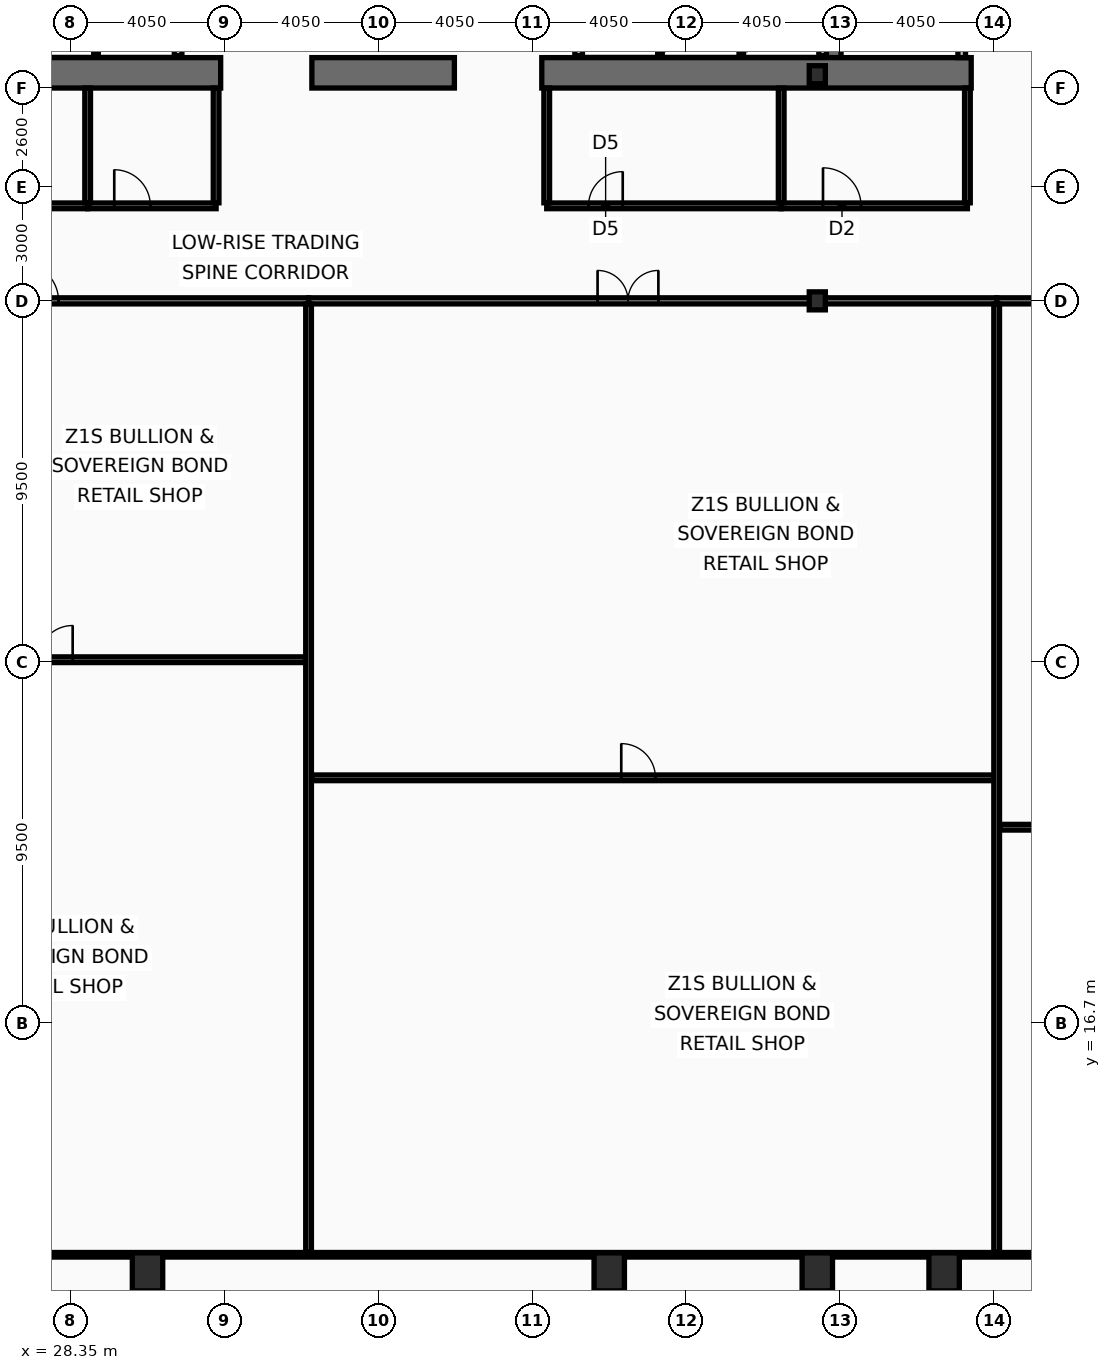
"""IFC4 building model, lengths in metres.
Left out: names, types, materials, properties, quantities, classifications, styles, units other than length and angle.
Written with IfcOpenShell. Run it as: python <this file> out.ifc"""

import sys

from ifc_helpers import new_model, si_unit, direction, frame, frame_2d, origin, origin_2d, place, context, subcontext, project, spatial, rectangle, hollow_rectangle, i_section, extrude, element, fill, save


model = new_model("IFC4")
c1 = context("Model", 3, precision=1e-05, world=origin(), true_north=direction((0.0, 1.0)))
c2 = subcontext(c1, "Body", "Model", "MODEL_VIEW")
j1 = project(units=[si_unit("LENGTHUNIT", "METRE"), si_unit("PLANEANGLEUNIT", "RADIAN")], contexts=[c1])
p1 = place(None, origin())
s1 = spatial("IfcSite", under=j1, at=p1, CompositionType="ELEMENT")
p2 = place(p1, origin())
s2 = spatial("IfcBuilding", under=s1, at=p2, CompositionType="ELEMENT")
p3 = place(p2, frame((0.0, 0.0, 53.8)))
s3 = spatial("IfcBuildingStorey", under=s2, at=p3, CompositionType="ELEMENT", Elevation=53.8)
p4 = place(p3, frame((48.4, 42.1, 0.0), z_axis=(0.0, 0.0, 1.0), x_axis=(0.0, 1.0, 0.0)))
e1 = element("IfcWall", 1, at=p4, inside=s3, PredefinedType="SHEAR", context=c2, shape_type="SweptSolid", body=[
    extrude(rectangle(XDim=10.8, YDim=0.45, at=frame_2d((5.4, 0.0))), origin(), (0.0, 0.0, 1.0), 3.82),
])
p5 = place(p3, frame((32.3, 41.7, 0.0), z_axis=(0.0, 0.0, 1.0), x_axis=(-1.0, 0.0, 0.0)))
e2 = element("IfcWall", 2, at=p5, inside=s3, PredefinedType="SHEAR", context=c2, shape_type="SweptSolid", body=[
    extrude(rectangle(XDim=11.45, YDim=0.8, at=frame_2d((5.725, 0.0))), origin(), (0.0, 0.0, 1.0), 3.82),
])
p6 = place(p3, frame((38.45, 41.7, 0.0), z_axis=(0.0, 0.0, 1.0), x_axis=(-1.0, 0.0, 0.0)))
e3 = element("IfcWall", 3, at=p6, inside=s3, PredefinedType="SHEAR", context=c2, shape_type="SweptSolid", body=[
    extrude(rectangle(XDim=3.75, YDim=0.8, at=frame_2d((1.875, 0.0))), origin(), (0.0, 0.0, 1.0), 3.82),
])
p7 = place(p3, frame((52.05, 41.7, 0.0), z_axis=(0.0, 0.0, 1.0), x_axis=(-1.0, 0.0, 0.0)))
e4 = element("IfcWall", 4, at=p7, inside=s3, PredefinedType="SHEAR", context=c2, shape_type="SweptSolid", body=[
    extrude(rectangle(XDim=11.3, YDim=0.8, at=frame_2d((5.65, 0.0))), origin(), (0.0, 0.0, 1.0), 3.82),
])
for number, where, z_axis, x_axis in (
    (5, (30.375, 10.15, 0.0), (0.0, 0.0, 1.0), (1.0, 0.0, 0.0)),
    (6, (42.525, 10.15, 0.0), (0.0, 0.0, 1.0), (1.0, 0.0, 0.0)),
    (7, (48.0, 10.15, 0.0), (0.0, 0.0, 1.0), (1.0, 0.0, 0.0)),
    (8, (51.337, 10.15, 0.0), (0.0, 0.0, 1.0), (1.0, 0.0, 0.0)),
):
    element("IfcColumn", number, at=place(p3, frame(where, z_axis=z_axis, x_axis=x_axis)), inside=s3, PredefinedType="COLUMN", context=c2, shape_type="SweptSolid", body=[
        extrude(hollow_rectangle(XDim=0.8, YDim=1.0, WallThickness=0.055, at=origin_2d()), origin(), (0.0, 0.0, 1.0), 4.0),
    ])
for number, where, z_axis, x_axis in (
    (9, (48.0, 35.7, 0.0), (0.0, 0.0, 1.0), (1.0, 0.0, 0.0)),
    (10, (48.0, 41.65, 0.0), (0.0, 0.0, 1.0), (1.0, 0.0, 0.0)),
):
    element("IfcColumn", number, at=place(p3, frame(where, z_axis=z_axis, x_axis=x_axis)), inside=s3, PredefinedType="COLUMN", context=c2, shape_type="SweptSolid", body=[
        extrude(i_section(OverallWidth=0.424, OverallDepth=0.474, WebThickness=0.048, FlangeThickness=0.077, at=origin_2d()), origin(), (0.0, 0.0, 1.0), 4.0),
    ])
p8 = place(p3, frame((51.8, 42.1, 0.0), z_axis=(0.0, 0.0, 1.0), x_axis=(0.0, 1.0, 0.0)))
e11 = element("IfcWall", 11, at=p8, inside=s3, PredefinedType="PARTITIONING", context=c2, shape_type="SweptSolid", body=[
    extrude(rectangle(XDim=2.395, YDim=0.2, at=frame_2d((1.198, 0.0))), origin(), (0.0, 0.0, 1.0), 3.82),
])
p9 = place(p8, frame((0.38, 0.0, 0.0)))
e12 = element("IfcOpeningElement", 12, at=p9, cuts=e11, PredefinedType="OPENING", context=c2, shape_type="SweptSolid", body=[
    extrude(rectangle(XDim=1.05, YDim=2.15, at=frame_2d((0.525, 1.075))), frame((0.0, 0.11, 0.0), z_axis=(0.0, -1.0, 0.0), x_axis=(1.0, 0.0, 0.0)), (0.0, 0.0, 1.0), 0.22),
])
p10 = place(p3, frame((31.18, 42.15, 0.0), z_axis=(0.0, 0.0, 1.0), x_axis=(0.0, 1.0, 0.0)))
e13 = element("IfcWall", 13, at=p10, inside=s3, PredefinedType="PARTITIONING", context=c2, shape_type="SweptSolid", body=[
    extrude(rectangle(XDim=2.095, YDim=0.2, at=frame_2d((1.048, 0.0))), origin(), (0.0, 0.0, 1.0), 3.82),
])
p11 = place(p3, frame((29.02, 42.15, 0.0), z_axis=(0.0, 0.0, 1.0), x_axis=(0.0, 1.0, 0.0)))
e14 = element("IfcWall", 14, at=p11, inside=s3, PredefinedType="PARTITIONING", context=c2, shape_type="SweptSolid", body=[
    extrude(rectangle(XDim=2.095, YDim=0.12, at=frame_2d((1.048, 0.0))), origin(), (0.0, 0.0, 1.0), 3.82),
])
for number, where, z_axis, x_axis in (
    (15, (41.72, 42.15, 0.0), (0.0, 0.0, 1.0), (0.0, 1.0, 0.0)),
    (16, (48.14, 42.15, 0.0), (0.0, 0.0, 1.0), (0.0, 1.0, 0.0)),
):
    element("IfcWall", number, at=place(p3, frame(where, z_axis=z_axis, x_axis=x_axis)), inside=s3, PredefinedType="PARTITIONING", context=c2, shape_type="SweptSolid", body=[
        extrude(rectangle(XDim=2.095, YDim=0.2, at=frame_2d((1.048, 0.0))), origin(), (0.0, 0.0, 1.0), 3.82),
    ])
for number, where, z_axis, x_axis in (
    (17, (43.86, 42.15, 0.0), (0.0, 0.0, 1.0), (0.0, 1.0, 0.0)),
    (18, (46.0, 42.15, 0.0), (0.0, 0.0, 1.0), (0.0, 1.0, 0.0)),
):
    element("IfcWall", number, at=place(p3, frame(where, z_axis=z_axis, x_axis=x_axis)), inside=s3, PredefinedType="PARTITIONING", context=c2, shape_type="SweptSolid", body=[
        extrude(rectangle(XDim=2.095, YDim=0.12, at=frame_2d((1.048, 0.0))), origin(), (0.0, 0.0, 1.0), 3.82),
    ])
p12 = place(p3, frame((25.5, 38.2, 0.0), z_axis=(0.0, 0.0, 1.0), x_axis=(1.0, 0.0, 0.0)))
e19 = element("IfcWall", 19, at=p12, inside=s3, PredefinedType="PARTITIONING", context=c2, shape_type="SweptSolid", body=[
    extrude(rectangle(XDim=3.3, YDim=0.15, at=frame_2d((1.65, 0.0))), origin(), (0.0, 0.0, 1.0), 3.82),
])
p13 = place(p12, frame((0.9, 0.0, 0.0)))
e20 = element("IfcOpeningElement", 20, at=p13, cuts=e19, PredefinedType="OPENING", context=c2, shape_type="SweptSolid", body=[
    extrude(rectangle(XDim=0.95, YDim=2.05, at=frame_2d((0.475, 1.025))), frame((0.0, 0.085, 0.0), z_axis=(0.0, -1.0, 0.0), x_axis=(1.0, 0.0, 0.0)), (0.0, 0.0, 1.0), 0.17),
])
p14 = place(p3, frame((28.8, 38.2, 0.0), z_axis=(0.0, 0.0, 1.0), x_axis=(1.0, 0.0, 0.0)))
e21 = element("IfcWall", 21, at=p14, inside=s3, PredefinedType="PARTITIONING", context=c2, shape_type="SweptSolid", body=[
    extrude(rectangle(XDim=3.38, YDim=0.15, at=frame_2d((1.69, 0.0))), origin(), (0.0, 0.0, 1.0), 3.01),
])
p15 = place(p14, frame((0.7, 0.0, 0.0)))
e22 = element("IfcOpeningElement", 22, at=p15, cuts=e21, PredefinedType="OPENING", context=c2, shape_type="SweptSolid", body=[
    extrude(rectangle(XDim=0.95, YDim=2.05, at=frame_2d((0.475, 1.025))), frame((0.0, 0.085, 0.0), z_axis=(0.0, -1.0, 0.0), x_axis=(1.0, 0.0, 0.0)), (0.0, 0.0, 1.0), 0.17),
])
for number, where, z_axis, x_axis in (
    (23, (28.8, 38.28, 0.0), (0.0, 0.0, 1.0), (0.0, 1.0, 0.0)),
    (24, (32.18, 38.28, 0.0), (0.0, 0.0, 1.0), (0.0, 1.0, 0.0)),
):
    element("IfcWall", number, at=place(p3, frame(where, z_axis=z_axis, x_axis=x_axis)), inside=s3, PredefinedType="PARTITIONING", context=c2, shape_type="SweptSolid", body=[
        extrude(rectangle(XDim=3.02, YDim=0.15, at=frame_2d((1.51, 0.0))), origin(), (0.0, 0.0, 1.0), 3.82),
    ])
p16 = place(p3, frame((40.88, 38.2, 0.0), z_axis=(0.0, 0.0, 1.0), x_axis=(1.0, 0.0, 0.0)))
e25 = element("IfcWall", 25, at=p16, inside=s3, PredefinedType="PARTITIONING", context=c2, shape_type="SweptSolid", body=[
    extrude(rectangle(XDim=6.17, YDim=0.15, at=frame_2d((3.085, 0.0))), origin(), (0.0, 0.0, 1.0), 3.01),
])
p17 = place(p16, frame((1.1, 0.0, 0.0)))
e26 = element("IfcOpeningElement", 26, at=p17, cuts=e25, PredefinedType="OPENING", context=c2, shape_type="SweptSolid", body=[
    extrude(rectangle(XDim=0.9, YDim=2.05, at=frame_2d((0.45, 1.025))), frame((0.0, 0.085, 0.0), z_axis=(0.0, -1.0, 0.0), x_axis=(1.0, 0.0, 0.0)), (0.0, 0.0, 1.0), 0.17),
])
p18 = place(p3, frame((47.05, 38.2, 0.0), z_axis=(0.0, 0.0, 1.0), x_axis=(1.0, 0.0, 0.0)))
e27 = element("IfcWall", 27, at=p18, inside=s3, PredefinedType="PARTITIONING", context=c2, shape_type="SweptSolid", body=[
    extrude(rectangle(XDim=4.9, YDim=0.15, at=frame_2d((2.45, 0.0))), origin(), (0.0, 0.0, 1.0), 3.01),
])
p19 = place(p18, frame((1.1, 0.0, 0.0)))
e28 = element("IfcOpeningElement", 28, at=p19, cuts=e27, PredefinedType="OPENING", context=c2, shape_type="SweptSolid", body=[
    extrude(rectangle(XDim=1.0, YDim=2.05, at=frame_2d((0.5, 1.025))), frame((0.0, 0.085, 0.0), z_axis=(0.0, -1.0, 0.0), x_axis=(1.0, 0.0, 0.0)), (0.0, 0.0, 1.0), 0.17),
])
for number, where, z_axis, x_axis in (
    (29, (40.88, 38.28, 0.0), (0.0, 0.0, 1.0), (0.0, 1.0, 0.0)),
    (30, (47.05, 38.28, 0.0), (0.0, 0.0, 1.0), (0.0, 1.0, 0.0)),
    (31, (51.95, 38.28, 0.0), (0.0, 0.0, 1.0), (0.0, 1.0, 0.0)),
):
    element("IfcWall", number, at=place(p3, frame(where, z_axis=z_axis, x_axis=x_axis)), inside=s3, PredefinedType="PARTITIONING", context=c2, shape_type="SweptSolid", body=[
        extrude(rectangle(XDim=3.02, YDim=0.15, at=frame_2d((1.51, 0.0))), origin(), (0.0, 0.0, 1.0), 3.82),
    ])
p20 = place(p3, frame((21.545, 35.7, 0.0), z_axis=(0.0, 0.0, 1.0), x_axis=(1.0, 0.0, 0.0)))
e32 = element("IfcWall", 32, at=p20, inside=s3, PredefinedType="PARTITIONING", context=c2, shape_type="SweptSolid", body=[
    extrude(rectangle(XDim=13.068, YDim=0.16, at=frame_2d((6.534, 0.0))), origin(), (0.0, 0.0, 1.0), 3.01),
])
p21 = place(p20, frame((5.489, 0.0, 0.0)))
e33 = element("IfcOpeningElement", 33, at=p21, cuts=e32, PredefinedType="OPENING", context=c2, shape_type="SweptSolid", body=[
    extrude(rectangle(XDim=1.0, YDim=2.05, at=frame_2d((0.5, 1.025))), frame((0.0, 0.09, 0.0), z_axis=(0.0, -1.0, 0.0), x_axis=(1.0, 0.0, 0.0)), (0.0, 0.0, 1.0), 0.18),
])
p22 = place(p3, frame((21.625, 26.257, 0.0), z_axis=(0.0, 0.0, 1.0), x_axis=(1.0, 0.0, 0.0)))
e34 = element("IfcWall", 34, at=p22, inside=s3, PredefinedType="PARTITIONING", context=c2, shape_type="SweptSolid", body=[
    extrude(rectangle(XDim=12.908, YDim=0.15, at=frame_2d((6.454, 0.0))), origin(), (0.0, 0.0, 1.0), 3.01),
])
p23 = place(p22, frame((5.881, 0.0, 0.0)))
e35 = element("IfcOpeningElement", 35, at=p23, cuts=e34, PredefinedType="OPENING", context=c2, shape_type="SweptSolid", body=[
    extrude(rectangle(XDim=0.9, YDim=2.05, at=frame_2d((0.45, 1.025))), frame((0.0, 0.085, 0.0), z_axis=(0.0, -1.0, 0.0), x_axis=(1.0, 0.0, 0.0)), (0.0, 0.0, 1.0), 0.17),
])
p24 = place(p3, frame((34.613, 35.7, 0.0), z_axis=(0.0, 0.0, 1.0), x_axis=(1.0, 0.0, 0.0)))
e36 = element("IfcWall", 36, at=p24, inside=s3, PredefinedType="PARTITIONING", context=c2, shape_type="SweptSolid", body=[
    extrude(rectangle(XDim=18.106, YDim=0.16, at=frame_2d((9.053, 0.0))), origin(), (0.0, 0.0, 1.0), 3.01),
])
p25 = place(p24, frame((7.605, 0.0, 0.0)))
e37 = element("IfcOpeningElement", 37, at=p25, cuts=e36, PredefinedType="OPENING", context=c2, shape_type="SweptSolid", body=[
    extrude(rectangle(XDim=1.6, YDim=2.15, at=frame_2d((0.8, 1.075))), frame((0.0, 0.09, 0.0), z_axis=(0.0, -1.0, 0.0), x_axis=(1.0, 0.0, 0.0)), (0.0, 0.0, 1.0), 0.18),
])
p26 = place(p3, frame((34.613, 10.665, 0.0), z_axis=(0.0, 0.0, 1.0), x_axis=(0.0, 1.0, 0.0)))
e38 = element("IfcWall", 38, at=p26, inside=s3, PredefinedType="PARTITIONING", context=c2, shape_type="SweptSolid", body=[
    extrude(rectangle(XDim=24.95, YDim=0.15, at=frame_2d((12.475, 0.0))), origin(), (0.0, 0.0, 1.0), 3.21),
])
p27 = place(p3, frame((34.693, 23.15, 0.0), z_axis=(0.0, 0.0, 1.0), x_axis=(1.0, 0.0, 0.0)))
e39 = element("IfcWall", 39, at=p27, inside=s3, PredefinedType="PARTITIONING", context=c2, shape_type="SweptSolid", body=[
    extrude(rectangle(XDim=17.947, YDim=0.15, at=frame_2d((8.973, 0.0))), origin(), (0.0, 0.0, 1.0), 3.01),
])
p28 = place(p27, frame((8.148, 0.0, 0.0)))
e40 = element("IfcOpeningElement", 40, at=p28, cuts=e39, PredefinedType="OPENING", context=c2, shape_type="SweptSolid", body=[
    extrude(rectangle(XDim=0.9, YDim=2.05, at=frame_2d((0.45, 1.025))), frame((0.0, 0.085, 0.0), z_axis=(0.0, -1.0, 0.0), x_axis=(1.0, 0.0, 0.0)), (0.0, 0.0, 1.0), 0.17),
])
p29 = place(p3, frame((52.72, 35.7, 0.0), z_axis=(0.0, 0.0, 1.0), x_axis=(1.0, 0.0, 0.0)))
e41 = element("IfcWall", 41, at=p29, inside=s3, PredefinedType="PARTITIONING", context=c2, shape_type="SweptSolid", body=[
    extrude(rectangle(XDim=18.15, YDim=0.16, at=frame_2d((9.075, 0.0))), origin(), (0.0, 0.0, 1.0), 3.01),
])
p30 = place(p29, frame((7.623, 0.0, 0.0)))
e42 = element("IfcOpeningElement", 42, at=p30, cuts=e41, PredefinedType="OPENING", context=c2, shape_type="SweptSolid", body=[
    extrude(rectangle(XDim=1.6, YDim=2.15, at=frame_2d((0.8, 1.075))), frame((0.0, 0.09, 0.0), z_axis=(0.0, -1.0, 0.0), x_axis=(1.0, 0.0, 0.0)), (0.0, 0.0, 1.0), 0.18),
])
p31 = place(p3, frame((52.72, 10.665, 0.0), z_axis=(0.0, 0.0, 1.0), x_axis=(0.0, 1.0, 0.0)))
e43 = element("IfcWall", 43, at=p31, inside=s3, PredefinedType="PARTITIONING", context=c2, shape_type="SweptSolid", body=[
    extrude(rectangle(XDim=24.95, YDim=0.15, at=frame_2d((12.475, 0.0))), origin(), (0.0, 0.0, 1.0), 3.21),
])
p32 = place(p3, frame((52.8, 21.85, 0.0), z_axis=(0.0, 0.0, 1.0), x_axis=(1.0, 0.0, 0.0)))
e44 = element("IfcWall", 44, at=p32, inside=s3, PredefinedType="PARTITIONING", context=c2, shape_type="SweptSolid", body=[
    extrude(rectangle(XDim=18.005, YDim=0.15, at=frame_2d((9.002, 0.0))), origin(), (0.0, 0.0, 1.0), 3.01),
])
p33 = place(p32, frame((8.167, 0.0, 0.0)))
e45 = element("IfcOpeningElement", 45, at=p33, cuts=e44, PredefinedType="OPENING", context=c2, shape_type="SweptSolid", body=[
    extrude(rectangle(XDim=0.9, YDim=2.05, at=frame_2d((0.45, 1.025))), frame((0.0, 0.085, 0.0), z_axis=(0.0, -1.0, 0.0), x_axis=(1.0, 0.0, 0.0)), (0.0, 0.0, 1.0), 0.17),
])
p34 = place(p3, frame((2.095, 10.6, 0.0), z_axis=(0.0, 0.0, 1.0), x_axis=(1.0, 0.0, 0.0)))
e46 = element("IfcWall", 46, at=p34, inside=s3, PredefinedType="PARTITIONING", context=c2, shape_type="SweptSolid", body=[
    extrude(rectangle(XDim=68.71, YDim=0.12, at=frame_2d((34.355, 0.0))), origin(), (0.0, 0.0, 1.0), 3.01),
])
p35 = place(p15, origin())
e47 = element("IfcDoor", 47, at=p35, inside=s3, OperationType="SINGLE_SWING_LEFT", PredefinedType="DOOR", context=c2, shape_type="SweptSolid", body=[
    extrude(rectangle(XDim=0.95, YDim=2.05, at=frame_2d((0.475, 1.025))), frame((0.0, 0.025, 0.0), z_axis=(0.0, -1.0, 0.0), x_axis=(1.0, 0.0, 0.0)), (0.0, 0.0, 1.0), 0.05),
])
fill(e22, e47)
p36 = place(p17, origin())
e48 = element("IfcDoor", 48, at=p36, inside=s3, OperationType="SINGLE_SWING_RIGHT", PredefinedType="DOOR", context=c2, shape_type="SweptSolid", body=[
    extrude(rectangle(XDim=0.9, YDim=2.05, at=frame_2d((0.45, 1.025))), frame((0.0, 0.025, 0.0), z_axis=(0.0, -1.0, 0.0), x_axis=(1.0, 0.0, 0.0)), (0.0, 0.0, 1.0), 0.05),
])
fill(e26, e48)
p37 = place(p19, origin())
e49 = element("IfcDoor", 49, at=p37, inside=s3, OperationType="SINGLE_SWING_LEFT", PredefinedType="DOOR", context=c2, shape_type="SweptSolid", body=[
    extrude(rectangle(XDim=1.0, YDim=2.05, at=frame_2d((0.5, 1.025))), frame((0.0, 0.025, 0.0), z_axis=(0.0, -1.0, 0.0), x_axis=(1.0, 0.0, 0.0)), (0.0, 0.0, 1.0), 0.05),
])
fill(e28, e49)
p38 = place(p21, origin())
e50 = element("IfcDoor", 50, at=p38, inside=s3, OperationType="SINGLE_SWING_LEFT", PredefinedType="DOOR", context=c2, shape_type="SweptSolid", body=[
    extrude(rectangle(XDim=1.0, YDim=2.05, at=frame_2d((0.5, 1.025))), frame((0.0, 0.025, 0.0), z_axis=(0.0, -1.0, 0.0), x_axis=(1.0, 0.0, 0.0)), (0.0, 0.0, 1.0), 0.05),
])
fill(e33, e50)
p39 = place(p23, origin())
e51 = element("IfcDoor", 51, at=p39, inside=s3, OperationType="SINGLE_SWING_RIGHT", PredefinedType="DOOR", context=c2, shape_type="SweptSolid", body=[
    extrude(rectangle(XDim=0.9, YDim=2.05, at=frame_2d((0.45, 1.025))), frame((0.0, 0.025, 0.0), z_axis=(0.0, -1.0, 0.0), x_axis=(1.0, 0.0, 0.0)), (0.0, 0.0, 1.0), 0.05),
])
fill(e35, e51)
p40 = place(p25, origin())
e52 = element("IfcDoor", 52, at=p40, inside=s3, OperationType="DOUBLE_DOOR_SINGLE_SWING", PredefinedType="DOOR", context=c2, shape_type="SweptSolid", body=[
    extrude(rectangle(XDim=1.6, YDim=2.15, at=frame_2d((0.8, 1.075))), frame((0.0, 0.025, 0.0), z_axis=(0.0, -1.0, 0.0), x_axis=(1.0, 0.0, 0.0)), (0.0, 0.0, 1.0), 0.05),
])
fill(e37, e52)
p41 = place(p28, origin())
e53 = element("IfcDoor", 53, at=p41, inside=s3, OperationType="SINGLE_SWING_LEFT", PredefinedType="DOOR", context=c2, shape_type="SweptSolid", body=[
    extrude(rectangle(XDim=0.9, YDim=2.05, at=frame_2d((0.45, 1.025))), frame((0.0, 0.025, 0.0), z_axis=(0.0, -1.0, 0.0), x_axis=(1.0, 0.0, 0.0)), (0.0, 0.0, 1.0), 0.05),
])
fill(e40, e53)
save(model, sys.argv[1])
